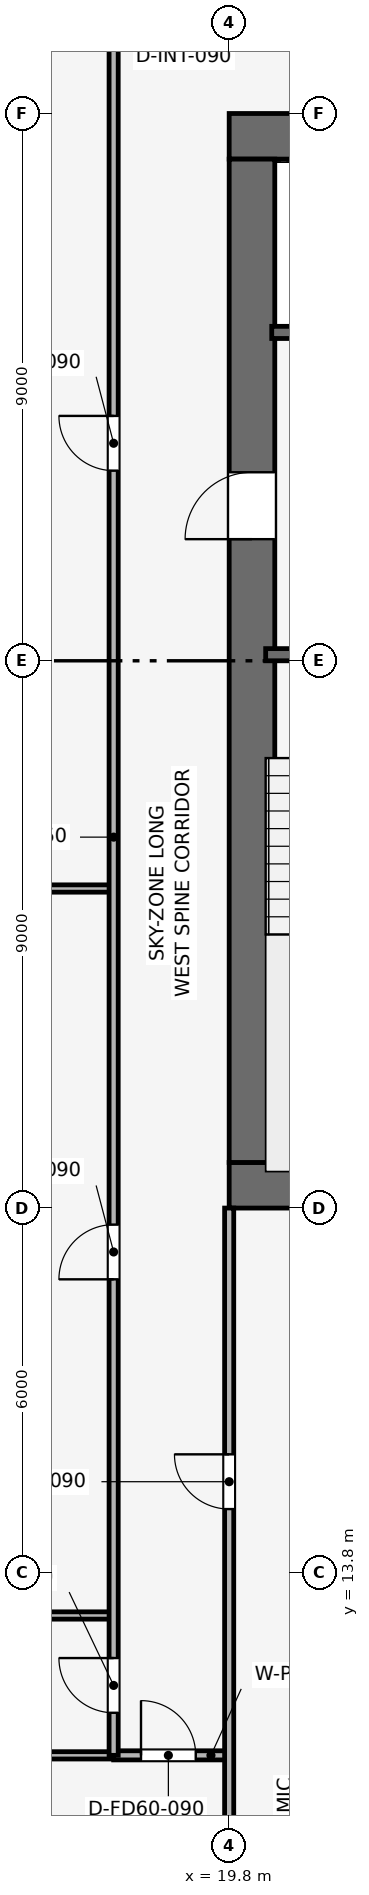
"""IFC4 building model, lengths in metres.
Left out: names, types, materials, properties, quantities, classifications, styles, units other than length and angle.
Written with IfcOpenShell. Run it as: python <this file> out.ifc"""

import sys

from ifc_helpers import new_model, si_unit, direction, frame, frame_2d, origin, place, context, subcontext, project, spatial, rectangle, extrude, element, fill, save


model = new_model("IFC4")
c1 = context("Model", 3, precision=1e-05, world=origin(), true_north=direction((0.0, 1.0)))
c2 = subcontext(c1, "Body", "Model", "MODEL_VIEW")
j1 = project(units=[si_unit("LENGTHUNIT", "METRE"), si_unit("PLANEANGLEUNIT", "RADIAN")], contexts=[c1])
p1 = place(None, origin())
s1 = spatial("IfcSite", under=j1, at=p1, CompositionType="ELEMENT")
p2 = place(p1, origin())
s2 = spatial("IfcBuilding", under=s1, at=p2, CompositionType="ELEMENT")
p3 = place(p2, frame((0.0, 0.0, 269.1)))
s3 = spatial("IfcBuildingStorey", under=s2, at=p3, CompositionType="ELEMENT", Elevation=269.1)
p4 = place(p3, frame((19.8, 20.175, 0.0), z_axis=(0.0, 0.0, 1.0), x_axis=(1.0, 0.0, 0.0)))
e1 = element("IfcWall", 1, at=p4, inside=s3, PredefinedType="SHEAR", context=c2, shape_type="SweptSolid", body=[
    extrude(rectangle(XDim=18.0, YDim=0.75, at=frame_2d((9.0, 0.0))), origin(), (0.0, 0.0, 1.0), 3.75),
])
p5 = place(p3, frame((19.8, 37.425, 0.0), z_axis=(0.0, 0.0, 1.0), x_axis=(1.0, 0.0, 0.0)))
e2 = element("IfcWall", 2, at=p5, inside=s3, PredefinedType="SHEAR", context=c2, shape_type="SweptSolid", body=[
    extrude(rectangle(XDim=18.0, YDim=0.75, at=frame_2d((9.0, 0.0))), origin(), (0.0, 0.0, 1.0), 3.75),
])
p6 = place(p5, frame((7.05, 0.0, 0.0)))
e3 = element("IfcOpeningElement", 3, at=p6, cuts=e2, PredefinedType="OPENING", context=c2, shape_type="SweptSolid", body=[
    extrude(rectangle(XDim=1.1, YDim=2.15, at=frame_2d((0.55, 1.075))), frame((0.0, 0.385, 0.0), z_axis=(0.0, -1.0, 0.0), x_axis=(1.0, 0.0, 0.0)), (0.0, 0.0, 1.0), 0.77),
])
p7 = place(p3, frame((20.175, 20.55, 0.0), z_axis=(0.0, 0.0, 1.0), x_axis=(0.0, 1.0, 0.0)))
e4 = element("IfcWall", 4, at=p7, inside=s3, PredefinedType="SHEAR", context=c2, shape_type="SweptSolid", body=[
    extrude(rectangle(XDim=16.5, YDim=0.75, at=frame_2d((8.25, 0.0))), origin(), (0.0, 0.0, 1.0), 3.75),
])
p8 = place(p7, frame((10.25, 0.0, 0.0)))
e5 = element("IfcOpeningElement", 5, at=p8, cuts=e4, PredefinedType="OPENING", context=c2, shape_type="SweptSolid", body=[
    extrude(rectangle(XDim=1.1, YDim=2.15, at=frame_2d((0.55, 1.075))), frame((0.0, 0.385, 0.0), z_axis=(0.0, -1.0, 0.0), x_axis=(1.0, 0.0, 0.0)), (0.0, 0.0, 1.0), 0.77),
])
p9 = place(p3, frame((20.4, 28.9, 0.0), z_axis=(0.0, 0.0, 1.0), x_axis=(1.0, 0.0, 0.0)))
e6 = element("IfcWall", 6, at=p9, inside=s3, PredefinedType="SHEAR", context=c2, shape_type="SweptSolid", body=[
    extrude(rectangle(XDim=3.15, YDim=0.2, at=frame_2d((1.575, 0.0))), origin(), (0.0, 0.0, 1.0), 3.5),
])
p10 = place(p9, frame((0.8, 0.0, 0.0)))
e7 = element("IfcOpeningElement", 7, at=p10, cuts=e6, PredefinedType="OPENING", context=c2, shape_type="SweptSolid", body=[
    extrude(rectangle(XDim=1.0, YDim=2.1, at=frame_2d((0.5, 1.05))), frame((0.0, 0.11, 0.0), z_axis=(0.0, -1.0, 0.0), x_axis=(1.0, 0.0, 0.0)), (0.0, 0.0, 1.0), 0.22),
])
p11 = place(p3, frame((20.5, 34.2, 0.0), z_axis=(0.0, 0.0, 1.0), x_axis=(1.0, 0.0, 0.0)))
e8 = element("IfcWall", 8, at=p11, inside=s3, PredefinedType="SHEAR", context=c2, shape_type="SweptSolid", body=[
    extrude(rectangle(XDim=3.05, YDim=0.2, at=frame_2d((1.525, 0.0))), origin(), (0.0, 0.0, 1.0), 3.5),
])
p12 = place(p11, frame((0.75, 0.0, 0.0)))
e9 = element("IfcOpeningElement", 9, at=p12, cuts=e8, PredefinedType="OPENING", context=c2, shape_type="SweptSolid", body=[
    extrude(rectangle(XDim=1.1, YDim=2.15, at=frame_2d((0.55, 1.075))), frame((0.0, 0.11, 0.0), z_axis=(0.0, -1.0, 0.0), x_axis=(1.0, 0.0, 0.0)), (0.0, 0.0, 1.0), 0.22),
])
for number, where, z_axis, x_axis in (
    (10, (4.03, 13.1, 0.0), (0.0, 0.0, 1.0), (1.0, 0.0, 0.0)),
    (11, (4.03, 25.055, 0.0), (0.0, 0.0, 1.0), (1.0, 0.0, 0.0)),
):
    element("IfcWall", number, at=place(p3, frame(where, z_axis=z_axis, x_axis=x_axis)), inside=s3, PredefinedType="PARTITIONING", context=c2, shape_type="SweptSolid", body=[
        extrude(rectangle(XDim=13.87, YDim=0.12, at=frame_2d((6.935, 0.0))), origin(), (0.0, 0.0, 1.0), 3.085),
    ])
p13 = place(p3, frame((10.8, 10.8, 0.0), z_axis=(0.0, 0.0, 1.0), x_axis=(1.0, 0.0, 0.0)))
e12 = element("IfcWall", 12, at=p13, inside=s3, PredefinedType="PARTITIONING", context=c2, shape_type="SweptSolid", body=[
    extrude(rectangle(XDim=7.1, YDim=0.12, at=frame_2d((3.55, 0.0))), origin(), (0.0, 0.0, 1.0), 3.085),
])
p14 = place(p3, frame((17.9, 10.8, 0.0), z_axis=(0.0, 0.0, 1.0), x_axis=(1.0, 0.0, 0.0)))
e13 = element("IfcWall", 13, at=p14, inside=s3, PredefinedType="PARTITIONING", context=c2, shape_type="SweptSolid", body=[
    extrude(rectangle(XDim=1.9, YDim=0.15, at=frame_2d((0.95, 0.0))), origin(), (0.0, 0.0, 1.0), 3.5),
])
p15 = place(p14, frame((0.45, 0.0, 0.0)))
e14 = element("IfcOpeningElement", 14, at=p15, cuts=e13, PredefinedType="OPENING", context=c2, shape_type="SweptSolid", body=[
    extrude(rectangle(XDim=0.9, YDim=2.1, at=frame_2d((0.45, 1.05))), frame((0.0, 0.085, 0.0), z_axis=(0.0, -1.0, 0.0), x_axis=(1.0, 0.0, 0.0)), (0.0, 0.0, 1.0), 0.17),
])
p16 = place(p3, frame((19.8, 4.03, 0.0), z_axis=(0.0, 0.0, 1.0), x_axis=(0.0, 1.0, 0.0)))
e15 = element("IfcWall", 15, at=p16, inside=s3, PredefinedType="PARTITIONING", context=c2, shape_type="SweptSolid", body=[
    extrude(rectangle(XDim=15.77, YDim=0.15, at=frame_2d((7.885, 0.0))), origin(), (0.0, 0.0, 1.0), 3.085),
])
p17 = place(p16, frame((10.82, 0.0, 0.0)))
e16 = element("IfcOpeningElement", 16, at=p17, cuts=e15, PredefinedType="OPENING", context=c2, shape_type="SweptSolid", body=[
    extrude(rectangle(XDim=0.9, YDim=2.1, at=frame_2d((0.45, 1.05))), frame((0.0, 0.085, 0.0), z_axis=(0.0, -1.0, 0.0), x_axis=(1.0, 0.0, 0.0)), (0.0, 0.0, 1.0), 0.17),
])
p18 = place(p3, frame((17.9, 10.8, 0.0), z_axis=(0.0, 0.0, 1.0), x_axis=(0.0, 1.0, 0.0)))
e17 = element("IfcWall", 17, at=p18, inside=s3, PredefinedType="PARTITIONING", context=c2, shape_type="SweptSolid", body=[
    extrude(rectangle(XDim=28.9, YDim=0.15, at=frame_2d((14.45, 0.0))), origin(), (0.0, 0.0, 1.0), 3.085),
])
p19 = place(p18, frame((0.7, 0.0, 0.0)))
e18 = element("IfcOpeningElement", 18, at=p19, cuts=e17, PredefinedType="OPENING", context=c2, shape_type="SweptSolid", body=[
    extrude(rectangle(XDim=0.9, YDim=2.1, at=frame_2d((0.45, 1.05))), frame((0.0, 0.085, 0.0), z_axis=(0.0, -1.0, 0.0), x_axis=(1.0, 0.0, 0.0)), (0.0, 0.0, 1.0), 0.17),
])
p20 = place(p18, frame((7.828, 0.0, 0.0)))
e19 = element("IfcOpeningElement", 19, at=p20, cuts=e17, PredefinedType="OPENING", context=c2, shape_type="SweptSolid", body=[
    extrude(rectangle(XDim=0.9, YDim=2.1, at=frame_2d((0.45, 1.05))), frame((0.0, 0.085, 0.0), z_axis=(0.0, -1.0, 0.0), x_axis=(1.0, 0.0, 0.0)), (0.0, 0.0, 1.0), 0.17),
])
p21 = place(p18, frame((21.127, 0.0, 0.0)))
e20 = element("IfcOpeningElement", 20, at=p21, cuts=e17, PredefinedType="OPENING", context=c2, shape_type="SweptSolid", body=[
    extrude(rectangle(XDim=0.9, YDim=2.1, at=frame_2d((0.45, 1.05))), frame((0.0, 0.085, 0.0), z_axis=(0.0, -1.0, 0.0), x_axis=(1.0, 0.0, 0.0)), (0.0, 0.0, 1.0), 0.17),
])
p22 = place(p15, origin())
e21 = element("IfcDoor", 21, at=p22, inside=s3, OperationType="SINGLE_SWING_LEFT", PredefinedType="DOOR", context=c2, shape_type="SweptSolid", body=[
    extrude(rectangle(XDim=0.9, YDim=2.1, at=frame_2d((0.45, 1.05))), frame((0.0, 0.025, 0.0), z_axis=(0.0, -1.0, 0.0), x_axis=(1.0, 0.0, 0.0)), (0.0, 0.0, 1.0), 0.05),
])
fill(e14, e21)
p23 = place(p17, origin())
e22 = element("IfcDoor", 22, at=p23, inside=s3, OperationType="SINGLE_SWING_RIGHT", PredefinedType="DOOR", context=c2, shape_type="SweptSolid", body=[
    extrude(rectangle(XDim=0.9, YDim=2.1, at=frame_2d((0.45, 1.05))), frame((0.0, 0.025, 0.0), z_axis=(0.0, -1.0, 0.0), x_axis=(1.0, 0.0, 0.0)), (0.0, 0.0, 1.0), 0.05),
])
fill(e16, e22)
p24 = place(p19, origin())
e23 = element("IfcDoor", 23, at=p24, inside=s3, OperationType="SINGLE_SWING_RIGHT", PredefinedType="DOOR", context=c2, shape_type="SweptSolid", body=[
    extrude(rectangle(XDim=0.9, YDim=2.1, at=frame_2d((0.45, 1.05))), frame((0.0, 0.025, 0.0), z_axis=(0.0, -1.0, 0.0), x_axis=(1.0, 0.0, 0.0)), (0.0, 0.0, 1.0), 0.05),
])
fill(e18, e23)
p25 = place(p20, origin())
e24 = element("IfcDoor", 24, at=p25, inside=s3, OperationType="SINGLE_SWING_LEFT", PredefinedType="DOOR", context=c2, shape_type="SweptSolid", body=[
    extrude(rectangle(XDim=0.9, YDim=2.1, at=frame_2d((0.45, 1.05))), frame((0.0, 0.025, 0.0), z_axis=(0.0, -1.0, 0.0), x_axis=(1.0, 0.0, 0.0)), (0.0, 0.0, 1.0), 0.05),
])
fill(e19, e24)
p26 = place(p21, origin())
e25 = element("IfcDoor", 25, at=p26, inside=s3, OperationType="SINGLE_SWING_RIGHT", PredefinedType="DOOR", context=c2, shape_type="SweptSolid", body=[
    extrude(rectangle(XDim=0.9, YDim=2.1, at=frame_2d((0.45, 1.05))), frame((0.0, 0.025, 0.0), z_axis=(0.0, -1.0, 0.0), x_axis=(1.0, 0.0, 0.0)), (0.0, 0.0, 1.0), 0.05),
])
fill(e20, e25)
p27 = place(p8, origin())
e26 = element("IfcDoor", 26, at=p27, inside=s3, OperationType="SINGLE_SWING_LEFT", PredefinedType="DOOR", context=c2, shape_type="SweptSolid", body=[
    extrude(rectangle(XDim=1.1, YDim=2.15, at=frame_2d((0.55, 1.075))), frame((0.0, 0.025, 0.0), z_axis=(0.0, -1.0, 0.0), x_axis=(1.0, 0.0, 0.0)), (0.0, 0.0, 1.0), 0.05),
])
fill(e5, e26)
save(model, sys.argv[1])
